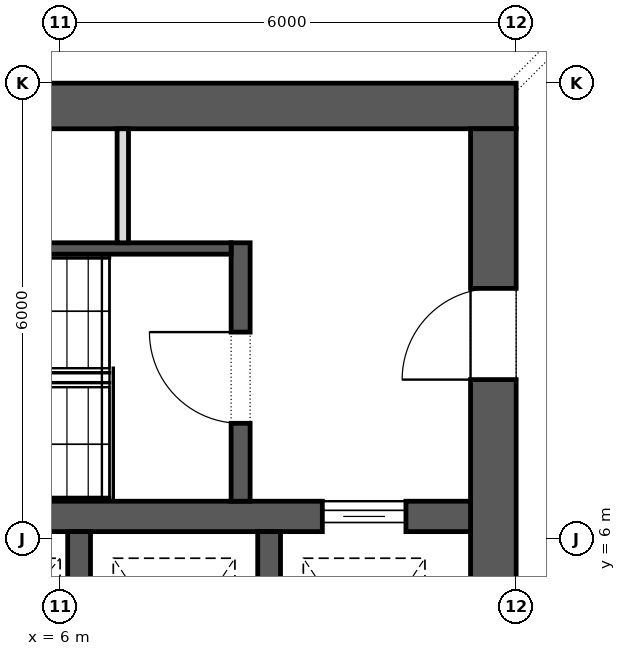
"""IFC4 building model, lengths in metres.
Left out: names, types, materials, properties, quantities, classifications, styles, units other than length and angle.
Written with IfcOpenShell. Run it as: python <this file> out.ifc"""

import sys

from ifc_helpers import new_model, si_unit, direction, frame, frame_2d, origin, place, context, subcontext, project, spatial, rectangle, extrude, element, fill, save


model = new_model("IFC4")
c1 = context("Model", 3, precision=1e-05, world=origin(), true_north=direction((0.0, 1.0)))
c2 = subcontext(c1, "Body", "Model", "MODEL_VIEW")
j1 = project(units=[si_unit("LENGTHUNIT", "METRE"), si_unit("PLANEANGLEUNIT", "RADIAN")], contexts=[c1])
p1 = place(None, origin())
s1 = spatial("IfcSite", under=j1, at=p1, CompositionType="ELEMENT")
p2 = place(p1, origin())
s2 = spatial("IfcBuilding", under=s1, at=p2, CompositionType="ELEMENT")
p3 = place(p2, frame((0.0, 0.0, 12.5)))
s3 = spatial("IfcBuildingStorey", under=s2, at=p3, CompositionType="ELEMENT", Elevation=12.5)
p4 = place(p3, frame((-12.0, 11.7, 0.0), z_axis=(0.0, 0.0, 1.0), x_axis=(1.0, 0.0, 0.0)))
e1 = element("IfcWall", 1, at=p4, inside=s3, PredefinedType="SHEAR", context=c2, shape_type="SweptSolid", body=[
    extrude(rectangle(XDim=24.0, YDim=0.6, at=frame_2d((12.0, 0.0))), origin(), (0.0, 0.0, 1.0), 5.5),
])
p5 = place(p4, frame((9.025, 0.0, 0.0)))
e2 = element("IfcOpeningElement", 2, at=p5, cuts=e1, PredefinedType="OPENING", context=c2, shape_type="SweptSolid", body=[
    extrude(rectangle(XDim=0.8, YDim=2.1, at=frame_2d((0.4, 1.05))), frame((0.0, 0.312, 0.0), z_axis=(0.0, -1.0, 0.0), x_axis=(1.0, 0.0, 0.0)), (0.0, 0.0, 1.0), 0.624),
])
p6 = place(p4, frame((10.625, 0.0, 0.0)))
e3 = element("IfcOpeningElement", 3, at=p6, cuts=e1, PredefinedType="OPENING", context=c2, shape_type="SweptSolid", body=[
    extrude(rectangle(XDim=0.9, YDim=2.1, at=frame_2d((0.45, 1.05))), frame((0.0, 0.312, 0.0), z_axis=(0.0, -1.0, 0.0), x_axis=(1.0, 0.0, 0.0)), (0.0, 0.0, 1.0), 0.624),
])
p7 = place(p4, frame((4.2, 0.0, 0.0)))
e4 = element("IfcOpeningElement", 4, at=p7, cuts=e1, PredefinedType="OPENING", context=c2, shape_type="SweptSolid", body=[
    extrude(rectangle(XDim=0.8, YDim=2.1, at=frame_2d((0.4, 1.05))), frame((0.0, 0.312, 0.0), z_axis=(0.0, -1.0, 0.0), x_axis=(1.0, 0.0, 0.0)), (0.0, 0.0, 1.0), 0.624),
])
p8 = place(p4, frame((6.2, 0.0, 0.0)))
e5 = element("IfcOpeningElement", 5, at=p8, cuts=e1, PredefinedType="OPENING", context=c2, shape_type="SweptSolid", body=[
    extrude(rectangle(XDim=0.8, YDim=2.1, at=frame_2d((0.4, 1.05))), frame((0.0, 0.312, 0.0), z_axis=(0.0, -1.0, 0.0), x_axis=(1.0, 0.0, 0.0)), (0.0, 0.0, 1.0), 0.624),
])
p9 = place(p4, frame((7.7, 0.0, 0.0)))
e6 = element("IfcOpeningElement", 6, at=p9, cuts=e1, PredefinedType="OPENING", context=c2, shape_type="SweptSolid", body=[
    extrude(rectangle(XDim=0.8, YDim=2.1, at=frame_2d((0.4, 1.05))), frame((0.0, 0.312, 0.0), z_axis=(0.0, -1.0, 0.0), x_axis=(1.0, 0.0, 0.0)), (0.0, 0.0, 1.0), 0.624),
])
p10 = place(p4, frame((15.85, 0.0, 0.0)))
e7 = element("IfcOpeningElement", 7, at=p10, cuts=e1, PredefinedType="OPENING", context=c2, shape_type="SweptSolid", body=[
    extrude(rectangle(XDim=0.8, YDim=2.1, at=frame_2d((0.4, 1.05))), frame((0.0, 0.312, 0.0), z_axis=(0.0, -1.0, 0.0), x_axis=(1.0, 0.0, 0.0)), (0.0, 0.0, 1.0), 0.624),
])
p11 = place(p3, frame((11.7, -11.4, 0.0), z_axis=(0.0, 0.0, 1.0), x_axis=(0.0, 1.0, 0.0)))
e8 = element("IfcWall", 8, at=p11, inside=s3, PredefinedType="SHEAR", context=c2, shape_type="SweptSolid", body=[
    extrude(rectangle(XDim=22.8, YDim=0.6, at=frame_2d((11.4, 0.0))), origin(), (0.0, 0.0, 1.0), 5.5),
])
p12 = place(p11, frame((10.2, 0.0, 0.0)))
e9 = element("IfcOpeningElement", 9, at=p12, cuts=e8, PredefinedType="OPENING", context=c2, shape_type="SweptSolid", body=[
    extrude(rectangle(XDim=2.4, YDim=2.1, at=frame_2d((1.2, 1.05))), frame((0.0, 0.312, 0.0), z_axis=(0.0, -1.0, 0.0), x_axis=(1.0, 0.0, 0.0)), (0.0, 0.0, 1.0), 0.624),
])
p13 = place(p11, frame((19.5, 0.0, 0.0)))
e10 = element("IfcOpeningElement", 10, at=p13, cuts=e8, PredefinedType="OPENING", context=c2, shape_type="SweptSolid", body=[
    extrude(rectangle(XDim=1.2, YDim=2.1, at=frame_2d((0.6, 1.05))), frame((0.0, 0.312, 0.0), z_axis=(0.0, -1.0, 0.0), x_axis=(1.0, 0.0, 0.0)), (0.0, 0.0, 1.0), 0.624),
])
p14 = place(p11, frame((2.1, 0.0, 0.0)))
e11 = element("IfcOpeningElement", 11, at=p14, cuts=e8, PredefinedType="OPENING", context=c2, shape_type="SweptSolid", body=[
    extrude(rectangle(XDim=1.2, YDim=2.1, at=frame_2d((0.6, 1.05))), frame((0.0, 0.312, 0.0), z_axis=(0.0, -1.0, 0.0), x_axis=(1.0, 0.0, 0.0)), (0.0, 0.0, 1.0), 0.624),
])
p15 = place(p3, frame((-11.4, 6.3, 0.0), z_axis=(0.0, 0.0, 1.0), x_axis=(1.0, 0.0, 0.0)))
e12 = element("IfcWall", 12, at=p15, inside=s3, PredefinedType="SHEAR", context=c2, shape_type="SweptSolid", body=[
    extrude(rectangle(XDim=22.8, YDim=0.4, at=frame_2d((11.4, 0.0))), origin(), (0.0, 0.0, 1.0), 5.5),
])
p16 = place(p15, frame((20.85, 0.0, 0.0)))
e13 = element("IfcOpeningElement", 13, at=p16, cuts=e12, PredefinedType="OPENING", context=c2, shape_type="SweptSolid", body=[
    extrude(rectangle(XDim=1.1, YDim=2.1, at=frame_2d((0.55, 1.05))), frame((0.0, 0.212, 0.0), z_axis=(0.0, -1.0, 0.0), x_axis=(1.0, 0.0, 0.0)), (0.0, 0.0, 1.0), 0.424),
])
for number, where, z_axis, x_axis in (
    (14, (6.25, 3.2, 0.0), (0.0, 0.0, 1.0), (0.0, 1.0, 0.0)),
    (15, (8.75, 3.2, 0.0), (0.0, 0.0, 1.0), (0.0, 1.0, 0.0)),
):
    element("IfcWall", number, at=place(p3, frame(where, z_axis=z_axis, x_axis=x_axis)), inside=s3, PredefinedType="SHEAR", context=c2, shape_type="SweptSolid", body=[
        extrude(rectangle(XDim=2.9, YDim=0.3, at=frame_2d((1.45, 0.0))), origin(), (0.0, 0.0, 1.0), 5.5),
    ])
p17 = place(p3, frame((8.375, 6.5, 0.0), z_axis=(0.0, 0.0, 1.0), x_axis=(0.0, 1.0, 0.0)))
e16 = element("IfcWall", 16, at=p17, inside=s3, PredefinedType="SHEAR", context=c2, shape_type="SweptSolid", body=[
    extrude(rectangle(XDim=3.4, YDim=0.25, at=frame_2d((1.7, 0.0))), origin(), (0.0, 0.0, 1.0), 5.15),
])
p18 = place(p17, frame((1.025, 0.0, 0.0)))
e17 = element("IfcOpeningElement", 17, at=p18, cuts=e16, PredefinedType="OPENING", context=c2, shape_type="SweptSolid", body=[
    extrude(rectangle(XDim=1.2, YDim=2.1, at=frame_2d((0.6, 1.05))), frame((0.0, 0.137, 0.0), z_axis=(0.0, -1.0, 0.0), x_axis=(1.0, 0.0, 0.0)), (0.0, 0.0, 1.0), 0.274),
])
p19 = place(p3, frame((0.25, 9.825, 0.0), z_axis=(0.0, 0.0, 1.0), x_axis=(1.0, 0.0, 0.0)))
e18 = element("IfcWall", 18, at=p19, inside=s3, PredefinedType="SHEAR", context=c2, shape_type="SweptSolid", body=[
    extrude(rectangle(XDim=8.0, YDim=0.15, at=frame_2d((4.0, 0.0))), origin(), (0.0, 0.0, 1.0), 5.15),
])
p20 = place(p3, frame((6.825, 9.9, 0.0), z_axis=(0.0, 0.0, 1.0), x_axis=(0.0, 1.0, 0.0)))
e19 = element("IfcWall", 19, at=p20, inside=s3, PredefinedType="PARTITIONING", context=c2, shape_type="SweptSolid", body=[
    extrude(rectangle(XDim=1.5, YDim=0.15, at=frame_2d((0.75, 0.0))), origin(), (0.0, 0.0, 1.0), 5.15),
])
p21 = place(p16, origin())
e20 = element("IfcDoor", 20, at=p21, inside=s3, OperationType="SLIDING_TO_LEFT", PredefinedType="DOOR", context=c2, shape_type="SweptSolid", body=[
    extrude(rectangle(XDim=1.1, YDim=2.1, at=frame_2d((0.55, 1.05))), frame((0.0, 0.025, 0.0), z_axis=(0.0, -1.0, 0.0), x_axis=(1.0, 0.0, 0.0)), (0.0, 0.0, 1.0), 0.05),
])
fill(e13, e20)
p22 = place(p18, origin())
e21 = element("IfcDoor", 21, at=p22, inside=s3, OperationType="SINGLE_SWING_LEFT", PredefinedType="DOOR", context=c2, shape_type="SweptSolid", body=[
    extrude(rectangle(XDim=1.2, YDim=2.1, at=frame_2d((0.6, 1.05))), frame((0.0, 0.025, 0.0), z_axis=(0.0, -1.0, 0.0), x_axis=(1.0, 0.0, 0.0)), (0.0, 0.0, 1.0), 0.05),
])
fill(e17, e21)
p23 = place(p13, origin())
e22 = element("IfcDoor", 22, at=p23, inside=s3, OperationType="SINGLE_SWING_RIGHT", PredefinedType="DOOR", context=c2, shape_type="SweptSolid", body=[
    extrude(rectangle(XDim=1.2, YDim=2.1, at=frame_2d((0.6, 1.05))), frame((0.0, 0.025, 0.0), z_axis=(0.0, -1.0, 0.0), x_axis=(1.0, 0.0, 0.0)), (0.0, 0.0, 1.0), 0.05),
])
fill(e10, e22)
save(model, sys.argv[1])
